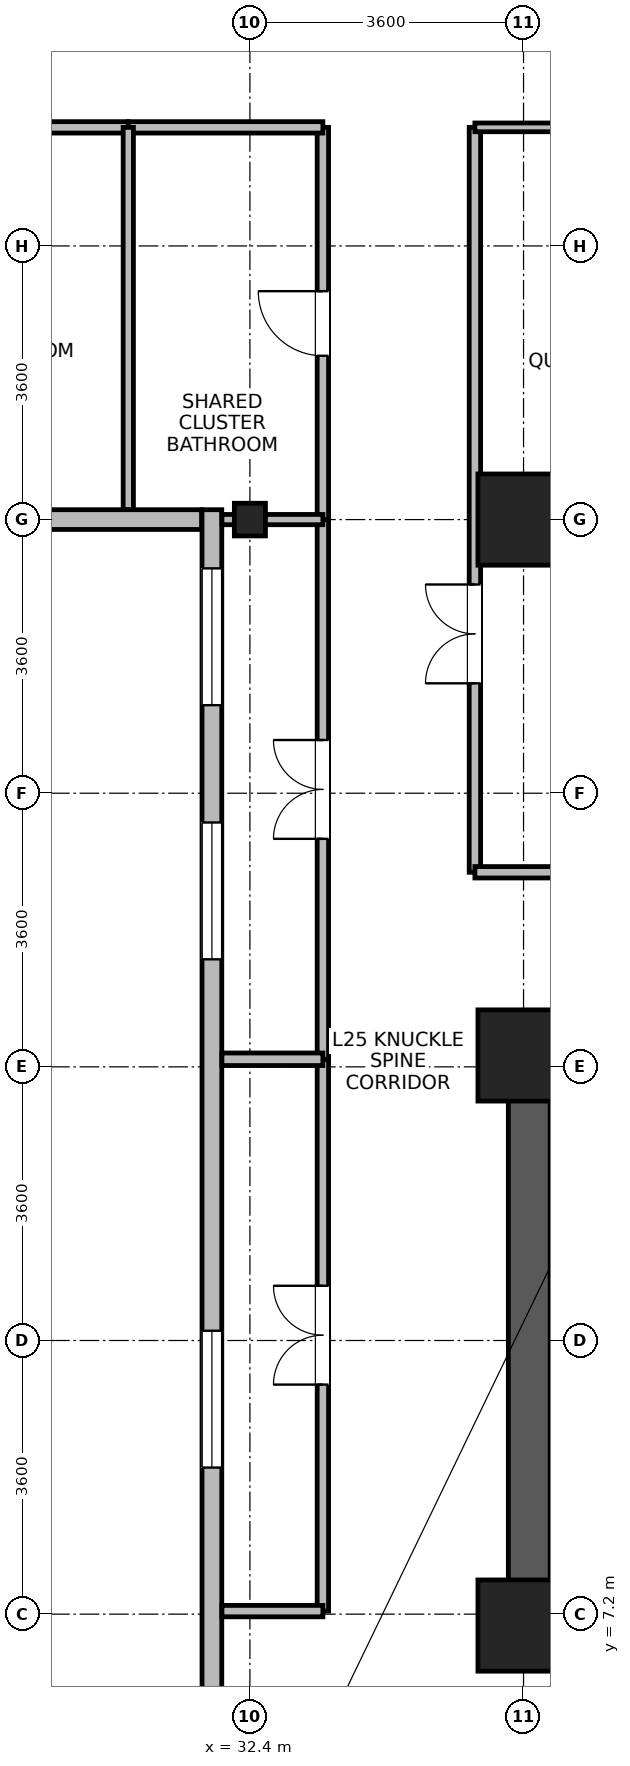
"""IFC4 building model, lengths in metres.
Left out: names, types, materials, properties, quantities, classifications, styles, units other than length and angle.
Written with IfcOpenShell. Run it as: python <this file> out.ifc"""

import sys

from ifc_helpers import new_model, si_unit, direction, frame, frame_2d, origin, origin_2d, place, context, subcontext, project, spatial, rectangle, i_section, extrude, source, transform, mapped, element, fill, save


model = new_model("IFC4")
c1 = context("Model", 3, precision=1e-05, world=origin(), true_north=direction((0.0, 1.0)))
c2 = subcontext(c1, "Body", "Model", "MODEL_VIEW")
j1 = project(units=[si_unit("LENGTHUNIT", "METRE"), si_unit("PLANEANGLEUNIT", "RADIAN")], contexts=[c1])
p1 = place(None, origin())
s1 = spatial("IfcSite", under=j1, at=p1, CompositionType="ELEMENT")
p2 = place(p1, origin())
s2 = spatial("IfcBuilding", under=s1, at=p2, CompositionType="ELEMENT")
p3 = place(p2, frame((0.0, 0.0, 100.8)))
s3 = spatial("IfcBuildingStorey", under=s2, at=p3, CompositionType="ELEMENT", Elevation=100.8)
p4 = place(p3, frame((36.075, 6.75, 0.0), z_axis=(0.0, 0.0, 1.0), x_axis=(0.0, 1.0, 0.0)))
e1 = element("IfcWall", 1, at=p4, inside=s3, PredefinedType="SHEAR", context=c2, shape_type="SweptSolid", body=[
    extrude(rectangle(XDim=8.1, YDim=0.55, at=frame_2d((4.05, 0.0))), origin(), (0.0, 0.0, 1.0), 3.45),
])
m1 = source(origin(), c2, "Body", "SweptSolid", [
    extrude(rectangle(XDim=1.2, YDim=1.2, at=origin_2d()), origin(), (0.0, 0.0, 1.0), 3.7),
])
for number, where, z_axis, x_axis in (
    (2, (36.0, 21.6, 0.0), (0.0, 0.0, 1.0), (1.0, 0.0, 0.0)),
    (3, (36.0, 7.05, 0.0), (0.0, 0.0, 1.0), (1.0, 0.0, 0.0)),
    (4, (36.0, 14.55, 0.0), (0.0, 0.0, 1.0), (1.0, 0.0, 0.0)),
):
    element("IfcColumn", number, at=place(p3, frame(where, z_axis=z_axis, x_axis=x_axis)), inside=s3, PredefinedType="COLUMN", context=c2, shape_type="MappedRepresentation", body=[
        mapped(m1, transform((0.0, 0.0, 0.0), x_axis=(1.0, 0.0, 0.0), y_axis=(0.0, 1.0, 0.0), z_axis=(0.0, 0.0, 1.0), scale=1.0)),
    ])
m2 = source(origin(), c2, "Body", "SweptSolid", [
    extrude(i_section(OverallWidth=0.409, OverallDepth=0.43, WebThickness=0.024, FlangeThickness=0.033, FilletRadius=0.015, at=origin_2d()), origin(), (0.0, 0.0, 1.0), 3.7),
])
p5 = place(p3, frame((32.4, 21.6, 0.0), z_axis=(0.0, 0.0, 1.0), x_axis=(1.0, 0.0, 0.0)))
e5 = element("IfcColumn", 5, at=p5, inside=s3, PredefinedType="COLUMN", context=c2, shape_type="MappedRepresentation", body=[
    mapped(m2, transform((0.0, 0.0, 0.0), x_axis=(1.0, 0.0, 0.0), y_axis=(0.0, 1.0, 0.0), z_axis=(0.0, 0.0, 1.0), scale=1.0)),
])
p6 = place(p3, frame((31.765, 21.6, 0.0), z_axis=(0.0, 0.0, 1.0), x_axis=(-1.0, 0.0, 0.0)))
e6 = element("IfcWall", 6, at=p6, inside=s3, PredefinedType="STANDARD", context=c2, shape_type="SweptSolid", body=[
    extrude(rectangle(XDim=2.364, YDim=0.26, at=frame_2d((1.182, 0.0))), origin(), (0.0, 0.0, 1.0), 2.98),
])
p7 = place(p3, frame((31.9, 1.67, 0.0), z_axis=(0.0, 0.0, 1.0), x_axis=(0.0, 1.0, 0.0)))
e7 = element("IfcWall", 7, at=p7, inside=s3, PredefinedType="STANDARD", context=c2, shape_type="SweptSolid", body=[
    extrude(rectangle(XDim=20.06, YDim=0.26, at=frame_2d((10.03, 0.0))), origin(), (0.0, 0.0, 1.0), 3.43),
])
p8 = place(p7, frame((0.772, 0.0, 0.85)))
e8 = element("IfcOpeningElement", 8, at=p8, cuts=e7, PredefinedType="OPENING", context=c2, shape_type="SweptSolid", body=[
    extrude(rectangle(XDim=1.8, YDim=1.85, at=frame_2d((0.9, 0.925))), frame((0.0, 0.14, 0.0), z_axis=(0.0, -1.0, 0.0), x_axis=(1.0, 0.0, 0.0)), (0.0, 0.0, 1.0), 0.28),
])
p9 = place(p7, frame((7.458, 0.0, 0.85)))
e9 = element("IfcOpeningElement", 9, at=p9, cuts=e7, PredefinedType="OPENING", context=c2, shape_type="SweptSolid", body=[
    extrude(rectangle(XDim=1.8, YDim=1.85, at=frame_2d((0.9, 0.925))), frame((0.0, 0.14, 0.0), z_axis=(0.0, -1.0, 0.0), x_axis=(1.0, 0.0, 0.0)), (0.0, 0.0, 1.0), 0.28),
])
p10 = place(p7, frame((14.145, 0.0, 0.85)))
e10 = element("IfcOpeningElement", 10, at=p10, cuts=e7, PredefinedType="OPENING", context=c2, shape_type="SweptSolid", body=[
    extrude(rectangle(XDim=1.8, YDim=1.85, at=frame_2d((0.9, 0.925))), frame((0.0, 0.14, 0.0), z_axis=(0.0, -1.0, 0.0), x_axis=(1.0, 0.0, 0.0)), (0.0, 0.0, 1.0), 0.28),
])
p11 = place(p7, frame((17.488, 0.0, 0.85)))
e11 = element("IfcOpeningElement", 11, at=p11, cuts=e7, PredefinedType="OPENING", context=c2, shape_type="SweptSolid", body=[
    extrude(rectangle(XDim=1.8, YDim=1.85, at=frame_2d((0.9, 0.925))), frame((0.0, 0.14, 0.0), z_axis=(0.0, -1.0, 0.0), x_axis=(1.0, 0.0, 0.0)), (0.0, 0.0, 1.0), 0.28),
])
p12 = place(p3, frame((35.36, 16.96, 0.0), z_axis=(0.0, 0.0, 1.0), x_axis=(0.0, 1.0, 0.0)))
e12 = element("IfcWall", 12, at=p12, inside=s3, PredefinedType="PARTITIONING", context=c2, shape_type="SweptSolid", body=[
    extrude(rectangle(XDim=9.8, YDim=0.15, at=frame_2d((4.9, 0.0))), origin(), (0.0, 0.0, 1.0), 3.43),
])
p13 = place(p12, frame((2.486, 0.0, 0.0)))
e13 = element("IfcOpeningElement", 13, at=p13, cuts=e12, PredefinedType="OPENING", context=c2, shape_type="SweptSolid", body=[
    extrude(rectangle(XDim=1.3, YDim=2.12, at=frame_2d((0.65, 1.06))), frame((0.0, 0.085, 0.0), z_axis=(0.0, -1.0, 0.0), x_axis=(1.0, 0.0, 0.0)), (0.0, 0.0, 1.0), 0.17),
])
p14 = place(p3, frame((33.36, 7.24, 0.0), z_axis=(0.0, 0.0, 1.0), x_axis=(0.0, 1.0, 0.0)))
e14 = element("IfcWall", 14, at=p14, inside=s3, PredefinedType="PARTITIONING", context=c2, shape_type="SweptSolid", body=[
    extrude(rectangle(XDim=7.26, YDim=0.15, at=frame_2d((3.63, 0.0))), origin(), (0.0, 0.0, 1.0), 3.43),
])
p15 = place(p14, frame((2.98, 0.0, 0.0)))
e15 = element("IfcOpeningElement", 15, at=p15, cuts=e14, PredefinedType="OPENING", context=c2, shape_type="SweptSolid", body=[
    extrude(rectangle(XDim=1.3, YDim=2.12, at=frame_2d((0.65, 1.06))), frame((0.0, 0.085, 0.0), z_axis=(0.0, -1.0, 0.0), x_axis=(1.0, 0.0, 0.0)), (0.0, 0.0, 1.0), 0.17),
])
p16 = place(p3, frame((33.36, 14.5, 0.0), z_axis=(0.0, 0.0, 1.0), x_axis=(0.0, 1.0, 0.0)))
e16 = element("IfcWall", 16, at=p16, inside=s3, PredefinedType="PARTITIONING", context=c2, shape_type="SweptSolid", body=[
    extrude(rectangle(XDim=7.1, YDim=0.15, at=frame_2d((3.55, 0.0))), origin(), (0.0, 0.0, 1.0), 3.43),
])
p17 = place(p16, frame((2.9, 0.0, 0.0)))
e17 = element("IfcOpeningElement", 17, at=p17, cuts=e16, PredefinedType="OPENING", context=c2, shape_type="SweptSolid", body=[
    extrude(rectangle(XDim=1.3, YDim=2.12, at=frame_2d((0.65, 1.06))), frame((0.0, 0.085, 0.0), z_axis=(0.0, -1.0, 0.0), x_axis=(1.0, 0.0, 0.0)), (0.0, 0.0, 1.0), 0.17),
])
p18 = place(p3, frame((35.36, 16.96, 0.0), z_axis=(0.0, 0.0, 1.0), x_axis=(1.0, 0.0, 0.0)))
e18 = element("IfcWall", 18, at=p18, inside=s3, PredefinedType="PARTITIONING", context=c2, shape_type="SweptSolid", body=[
    extrude(rectangle(XDim=5.86, YDim=0.15, at=frame_2d((2.93, 0.0))), origin(), (0.0, 0.0, 1.0), 3.43),
])
p19 = place(p3, frame((25.52, 26.76, 0.0), z_axis=(0.0, 0.0, 1.0), x_axis=(1.0, 0.0, 0.0)))
e19 = element("IfcWall", 19, at=p19, inside=s3, PredefinedType="PARTITIONING", context=c2, shape_type="SweptSolid", body=[
    extrude(rectangle(XDim=5.28, YDim=0.15, at=frame_2d((2.64, 0.0))), origin(), (0.0, 0.0, 1.0), 3.43),
])
p20 = place(p19, frame((2.165, 0.0, 0.0)))
e20 = element("IfcOpeningElement", 20, at=p20, cuts=e19, PredefinedType="OPENING", context=c2, shape_type="SweptSolid", body=[
    extrude(rectangle(XDim=0.95, YDim=2.1, at=frame_2d((0.475, 1.05))), frame((0.0, 0.085, 0.0), z_axis=(0.0, -1.0, 0.0), x_axis=(1.0, 0.0, 0.0)), (0.0, 0.0, 1.0), 0.17),
])
p21 = place(p3, frame((33.36, 21.6, 0.0), z_axis=(0.0, 0.0, 1.0), x_axis=(0.0, 1.0, 0.0)))
e21 = element("IfcWall", 21, at=p21, inside=s3, PredefinedType="PARTITIONING", context=c2, shape_type="SweptSolid", body=[
    extrude(rectangle(XDim=5.16, YDim=0.15, at=frame_2d((2.58, 0.0))), origin(), (0.0, 0.0, 1.0), 3.43),
])
p22 = place(p21, frame((2.155, 0.0, 0.0)))
e22 = element("IfcOpeningElement", 22, at=p22, cuts=e21, PredefinedType="OPENING", context=c2, shape_type="SweptSolid", body=[
    extrude(rectangle(XDim=0.85, YDim=2.04, at=frame_2d((0.425, 1.02))), frame((0.0, 0.085, 0.0), z_axis=(0.0, -1.0, 0.0), x_axis=(1.0, 0.0, 0.0)), (0.0, 0.0, 1.0), 0.17),
])
p23 = place(p3, frame((30.8, 26.76, 0.0), z_axis=(0.0, 0.0, 1.0), x_axis=(1.0, 0.0, 0.0)))
e23 = element("IfcWall", 23, at=p23, inside=s3, PredefinedType="PARTITIONING", context=c2, shape_type="SweptSolid", body=[
    extrude(rectangle(XDim=2.56, YDim=0.15, at=frame_2d((1.28, 0.0))), origin(), (0.0, 0.0, 1.0), 3.43),
])
p24 = place(p3, frame((32.032, 7.24, 0.0), z_axis=(0.0, 0.0, 1.0), x_axis=(1.0, 0.0, 0.0)))
e24 = element("IfcWall", 24, at=p24, inside=s3, PredefinedType="PARTITIONING", context=c2, shape_type="SweptSolid", body=[
    extrude(rectangle(XDim=1.328, YDim=0.15, at=frame_2d((0.664, 0.0))), origin(), (0.0, 0.0, 1.0), 3.43),
])
p25 = place(p3, frame((35.36, 26.76, 0.0), z_axis=(0.0, 0.0, 1.0), x_axis=(1.0, 0.0, 0.0)))
e25 = element("IfcWall", 25, at=p25, inside=s3, PredefinedType="PARTITIONING", context=c2, shape_type="SweptSolid", body=[
    extrude(rectangle(XDim=5.86, YDim=0.115, at=frame_2d((2.93, 0.0))), origin(), (0.0, 0.0, 1.0), 3.43),
])
p26 = place(p3, frame((30.8, 21.732, 0.0), z_axis=(0.0, 0.0, 1.0), x_axis=(0.0, 1.0, 0.0)))
e26 = element("IfcWall", 26, at=p26, inside=s3, PredefinedType="PARTITIONING", context=c2, shape_type="SweptSolid", body=[
    extrude(rectangle(XDim=5.028, YDim=0.135, at=frame_2d((2.514, 0.0))), origin(), (0.0, 0.0, 1.0), 3.43),
])
p27 = place(p3, frame((32.032, 14.5, 0.0), z_axis=(0.0, 0.0, 1.0), x_axis=(1.0, 0.0, 0.0)))
e27 = element("IfcWall", 27, at=p27, inside=s3, PredefinedType="PARTITIONING", context=c2, shape_type="SweptSolid", body=[
    extrude(rectangle(XDim=1.328, YDim=0.165, at=frame_2d((0.664, 0.0))), origin(), (0.0, 0.0, 1.0), 3.43),
])
p28 = place(p3, frame((32.032, 21.6, 0.0), z_axis=(0.0, 0.0, 1.0), x_axis=(1.0, 0.0, 0.0)))
e28 = element("IfcWall", 28, at=p28, inside=s3, PredefinedType="PARTITIONING", context=c2, shape_type="SweptSolid", body=[
    extrude(rectangle(XDim=1.328, YDim=0.135, at=frame_2d((0.664, 0.0))), origin(), (0.0, 0.0, 1.0), 2.98),
])
p29 = place(p9, origin())
e29 = element("IfcWindow", 29, at=p29, inside=s3, PartitioningType="SINGLE_PANEL", PredefinedType="WINDOW", context=c2, shape_type="SweptSolid", body=[
    extrude(rectangle(XDim=1.8, YDim=1.85, at=frame_2d((0.9, 0.925))), frame((0.0, 0.03, 0.0), z_axis=(0.0, -1.0, 0.0), x_axis=(1.0, 0.0, 0.0)), (0.0, 0.0, 1.0), 0.06),
])
fill(e9, e29)
p30 = place(p10, origin())
e30 = element("IfcWindow", 30, at=p30, inside=s3, PartitioningType="SINGLE_PANEL", PredefinedType="WINDOW", context=c2, shape_type="SweptSolid", body=[
    extrude(rectangle(XDim=1.8, YDim=1.85, at=frame_2d((0.9, 0.925))), frame((0.0, 0.03, 0.0), z_axis=(0.0, -1.0, 0.0), x_axis=(1.0, 0.0, 0.0)), (0.0, 0.0, 1.0), 0.06),
])
fill(e10, e30)
p31 = place(p11, origin())
e31 = element("IfcWindow", 31, at=p31, inside=s3, PartitioningType="SINGLE_PANEL", PredefinedType="WINDOW", context=c2, shape_type="SweptSolid", body=[
    extrude(rectangle(XDim=1.8, YDim=1.85, at=frame_2d((0.9, 0.925))), frame((0.0, 0.03, 0.0), z_axis=(0.0, -1.0, 0.0), x_axis=(1.0, 0.0, 0.0)), (0.0, 0.0, 1.0), 0.06),
])
fill(e11, e31)
p32 = place(p13, origin())
e32 = element("IfcDoor", 32, at=p32, inside=s3, OperationType="DOUBLE_DOOR_SINGLE_SWING", PredefinedType="DOOR", context=c2, shape_type="SweptSolid", body=[
    extrude(rectangle(XDim=1.3, YDim=2.12, at=frame_2d((0.65, 1.06))), frame((0.0, 0.025, 0.0), z_axis=(0.0, -1.0, 0.0), x_axis=(1.0, 0.0, 0.0)), (0.0, 0.0, 1.0), 0.05),
])
fill(e13, e32)
p33 = place(p15, origin())
e33 = element("IfcDoor", 33, at=p33, inside=s3, OperationType="DOUBLE_DOOR_SINGLE_SWING", PredefinedType="DOOR", context=c2, shape_type="SweptSolid", body=[
    extrude(rectangle(XDim=1.3, YDim=2.12, at=frame_2d((0.65, 1.06))), frame((0.0, 0.025, 0.0), z_axis=(0.0, -1.0, 0.0), x_axis=(1.0, 0.0, 0.0)), (0.0, 0.0, 1.0), 0.05),
])
fill(e15, e33)
p34 = place(p17, origin())
e34 = element("IfcDoor", 34, at=p34, inside=s3, OperationType="DOUBLE_DOOR_SINGLE_SWING", PredefinedType="DOOR", context=c2, shape_type="SweptSolid", body=[
    extrude(rectangle(XDim=1.3, YDim=2.12, at=frame_2d((0.65, 1.06))), frame((0.0, 0.025, 0.0), z_axis=(0.0, -1.0, 0.0), x_axis=(1.0, 0.0, 0.0)), (0.0, 0.0, 1.0), 0.05),
])
fill(e17, e34)
p35 = place(p22, origin())
e35 = element("IfcDoor", 35, at=p35, inside=s3, OperationType="SINGLE_SWING_RIGHT", PredefinedType="DOOR", context=c2, shape_type="SweptSolid", body=[
    extrude(rectangle(XDim=0.85, YDim=2.04, at=frame_2d((0.425, 1.02))), frame((0.0, 0.025, 0.0), z_axis=(0.0, -1.0, 0.0), x_axis=(1.0, 0.0, 0.0)), (0.0, 0.0, 1.0), 0.05),
])
fill(e22, e35)
save(model, sys.argv[1])
